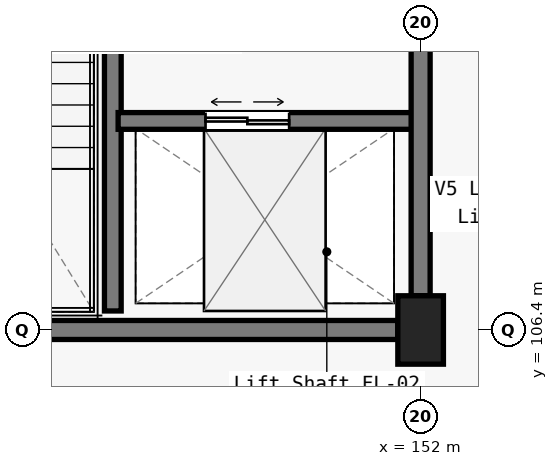
"""IFC4 building model, lengths in metres.
Left out: names, types, materials, properties, quantities, classifications, styles, units other than length and angle.
Written with IfcOpenShell. Run it as: python <this file> out.ifc"""

import sys

from ifc_helpers import new_model, si_unit, direction, frame, frame_2d, origin, origin_2d, place, context, subcontext, project, spatial, rectangle, extrude, element, fill, save


model = new_model("IFC4")
c1 = context("Model", 3, precision=1e-05, world=origin(), true_north=direction((0.0, 1.0)))
c2 = subcontext(c1, "Body", "Model", "MODEL_VIEW")
j1 = project(units=[si_unit("LENGTHUNIT", "METRE"), si_unit("PLANEANGLEUNIT", "RADIAN")], contexts=[c1])
p1 = place(None, origin())
s1 = spatial("IfcSite", under=j1, at=p1, CompositionType="ELEMENT")
p2 = place(p1, origin())
s2 = spatial("IfcBuilding", under=s1, at=p2, CompositionType="ELEMENT")
p3 = place(p2, frame((0.0, 0.0, 15.0)))
s3 = spatial("IfcBuildingStorey", under=s2, at=p3, CompositionType="ELEMENT", Elevation=15.0)
p4 = place(p3, frame((152.0, 106.4, 0.0), z_axis=(0.0, 0.0, 1.0), x_axis=(1.0, 0.0, 0.0)))
e1 = element("IfcColumn", 1, at=p4, inside=s3, PredefinedType="COLUMN", context=c2, shape_type="SweptSolid", body=[
    extrude(rectangle(XDim=0.6, YDim=0.9, at=origin_2d()), origin(), (0.0, 0.0, 1.0), 4.8),
])
p5 = place(p3, frame((144.35, 106.4, 0.0), z_axis=(0.0, 0.0, 1.0), x_axis=(1.0, 0.0, 0.0)))
e2 = element("IfcWall", 2, at=p5, inside=s3, PredefinedType="SOLIDWALL", context=c2, shape_type="SweptSolid", body=[
    extrude(rectangle(XDim=7.35, YDim=0.25, at=frame_2d((3.675, 0.0))), origin(), (0.0, 0.0, 1.0), 3.57),
])
p6 = place(p3, frame((147.95, 106.65, 0.0), z_axis=(0.0, 0.0, 1.0), x_axis=(0.0, 1.0, 0.0)))
e3 = element("IfcWall", 3, at=p6, inside=s3, PredefinedType="SOLIDWALL", context=c2, shape_type="SweptSolid", body=[
    extrude(rectangle(XDim=7.1, YDim=0.22, at=frame_2d((3.55, 0.0))), origin(), (0.0, 0.0, 1.0), 4.53),
])
p7 = place(p6, frame((5.55, 0.0, 0.0)))
e4 = element("IfcOpeningElement", 4, at=p7, cuts=e3, PredefinedType="OPENING", context=c2, shape_type="SweptSolid", body=[
    extrude(rectangle(XDim=1.2, YDim=2.15, at=frame_2d((0.6, 1.075))), frame((0.0, 0.12, 0.0), z_axis=(0.0, -1.0, 0.0), x_axis=(1.0, 0.0, 0.0)), (0.0, 0.0, 1.0), 0.24),
])
p8 = place(p3, frame((148.02, 109.15, 0.0), z_axis=(0.0, 0.0, 1.0), x_axis=(1.0, 0.0, 0.0)))
e5 = element("IfcWall", 5, at=p8, inside=s3, PredefinedType="SOLIDWALL", context=c2, shape_type="SweptSolid", body=[
    extrude(rectangle(XDim=3.93, YDim=0.22, at=frame_2d((1.965, 0.0))), origin(), (0.0, 0.0, 1.0), 3.88),
])
p9 = place(p8, frame((1.15, 0.0, 0.0)))
e6 = element("IfcOpeningElement", 6, at=p9, cuts=e5, PredefinedType="OPENING", context=c2, shape_type="SweptSolid", body=[
    extrude(rectangle(XDim=1.1, YDim=2.2, at=frame_2d((0.55, 1.1))), frame((0.0, 0.12, 0.0), z_axis=(0.0, -1.0, 0.0), x_axis=(1.0, 0.0, 0.0)), (0.0, 0.0, 1.0), 0.24),
])
p10 = place(p3, frame((152.0, 106.85, 0.0), z_axis=(0.0, 0.0, 1.0), x_axis=(0.0, 1.0, 0.0)))
e7 = element("IfcWall", 7, at=p10, inside=s3, PredefinedType="SOLIDWALL", context=c2, shape_type="SweptSolid", body=[
    extrude(rectangle(XDim=6.775, YDim=0.25, at=frame_2d((3.387, 0.0))), origin(), (0.0, 0.0, 1.0), 3.755),
])
p11 = place(p10, frame((3.4, 0.0, 0.0)))
e8 = element("IfcOpeningElement", 8, at=p11, cuts=e7, PredefinedType="OPENING", context=c2, shape_type="SweptSolid", body=[
    extrude(rectangle(XDim=1.35, YDim=2.2, at=frame_2d((0.675, 1.1))), frame((0.0, 0.135, 0.0), z_axis=(0.0, -1.0, 0.0), x_axis=(1.0, 0.0, 0.0)), (0.0, 0.0, 1.0), 0.27),
])
p12 = place(p9, origin())
e9 = element("IfcDoor", 9, at=p12, inside=s3, OperationType="DOUBLE_DOOR_SLIDING", PredefinedType="DOOR", context=c2, shape_type="SweptSolid", body=[
    extrude(rectangle(XDim=1.1, YDim=2.2, at=frame_2d((0.55, 1.1))), frame((0.0, 0.025, 0.0), z_axis=(0.0, -1.0, 0.0), x_axis=(1.0, 0.0, 0.0)), (0.0, 0.0, 1.0), 0.05),
])
fill(e6, e9)
save(model, sys.argv[1])
